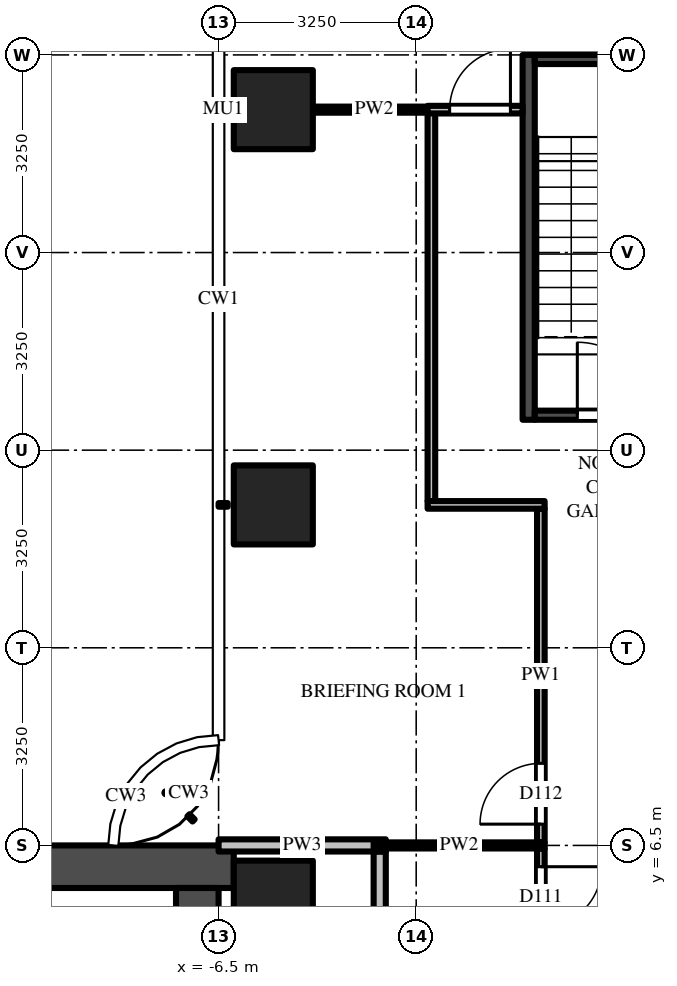
"""IFC4 building model, lengths in metres.
Left out: names, types, materials, properties, quantities, classifications, styles, units other than length and angle.
Written with IfcOpenShell. Run it as: python <this file> out.ifc"""

import sys

from ifc_helpers import new_model, si_unit, direction, frame, frame_2d, origin, origin_2d, place, context, subcontext, project, spatial, rectangle, extrude, source, transform, mapped, element, fill, save


model = new_model("IFC4")
c1 = context("Model", 3, precision=1e-05, world=origin(), true_north=direction((0.0, 1.0)))
c2 = subcontext(c1, "Body", "Model", "MODEL_VIEW")
j1 = project(units=[si_unit("LENGTHUNIT", "METRE"), si_unit("PLANEANGLEUNIT", "RADIAN")], contexts=[c1])
p1 = place(None, origin())
s1 = spatial("IfcSite", under=j1, at=p1, CompositionType="ELEMENT")
p2 = place(p1, origin())
s2 = spatial("IfcBuilding", under=s1, at=p2, CompositionType="ELEMENT")
p3 = place(p2, frame((0.0, 0.0, 138.0)))
s3 = spatial("IfcBuildingStorey", under=s2, at=p3, CompositionType="ELEMENT", Elevation=138.0)
m1 = source(origin(), c2, "Body", "SweptSolid", [
    extrude(rectangle(XDim=1.3, YDim=1.3, at=origin_2d()), origin(), (0.0, 0.0, 1.0), 4.5),
])
for number, where, z_axis, x_axis in (
    (1, (-5.6, 12.1, 0.0), (0.0, 0.0, 1.0), (1.0, 0.0, 0.0)),
    (2, (-5.6, 18.6, 0.0), (0.0, 0.0, 1.0), (1.0, 0.0, 0.0)),
    (3, (-5.6, 5.6, 0.0), (0.0, 0.0, 1.0), (1.0, 0.0, 0.0)),
):
    element("IfcColumn", number, at=place(p3, frame(where, z_axis=z_axis, x_axis=x_axis)), inside=s3, PredefinedType="COLUMN", context=c2, shape_type="MappedRepresentation", body=[
        mapped(m1, transform((0.0, 0.0, 0.0))),
    ])
m2 = source(origin(), c2, "Body", "SweptSolid", [
    extrude(rectangle(XDim=16.5, YDim=0.7, at=frame_2d((8.25, 0.0))), origin(), (0.0, 0.0, 1.0), 4.25),
])
p4 = place(p3, frame((-6.25, 6.15, 0.0), z_axis=(0.0, 0.0, 1.0), x_axis=(-1.0, 0.0, 0.0)))
e4 = element("IfcWall", 4, at=p4, inside=s3, PredefinedType="SHEAR", context=c2, shape_type="MappedRepresentation", body=[
    mapped(m2, transform((0.0, 0.0, 0.0))),
])
m3 = source(origin(), c2, "Body", "SweptSolid", [
    extrude(rectangle(XDim=9.05, YDim=0.7, at=frame_2d((4.525, 0.0))), origin(), (0.0, 0.0, 1.0), 4.25),
])
p5 = place(p3, frame((-6.85, 5.8, 0.0), z_axis=(0.0, 0.0, 1.0), x_axis=(0.0, -1.0, 0.0)))
e5 = element("IfcWall", 5, at=p5, inside=s3, PredefinedType="SHEAR", context=c2, shape_type="MappedRepresentation", body=[
    mapped(m3, transform((0.0, 0.0, 0.0))),
])
m4 = source(origin(), c2, "Body", "SweptSolid", [
    extrude(rectangle(XDim=1.8, YDim=2.1, at=frame_2d((0.9, 1.05))), frame((0.0, 0.36, 0.0), z_axis=(0.0, -1.0, 0.0), x_axis=(1.0, 0.0, 0.0)), (0.0, 0.0, 1.0), 0.72),
])
p6 = place(p5, frame((3.15, 0.0, 0.0)))
e6 = element("IfcOpeningElement", 6, at=p6, cuts=e5, PredefinedType="OPENING", context=c2, shape_type="MappedRepresentation", body=[
    mapped(m4, transform((0.0, 0.0, 0.0))),
])
m5 = source(origin(), c2, "Body", "SweptSolid", [
    extrude(rectangle(XDim=6.0, YDim=0.2, at=frame_2d((3.0, 0.0))), origin(), (0.0, 0.0, 1.0), 4.25),
])
p7 = place(p3, frame((-1.4, 13.5, 0.0), z_axis=(0.0, 0.0, 1.0), x_axis=(0.0, 1.0, 0.0)))
e7 = element("IfcWall", 7, at=p7, inside=s3, PredefinedType="SHEAR", context=c2, shape_type="MappedRepresentation", body=[
    mapped(m5, transform((0.0, 0.0, 0.0))),
])
m6 = source(origin(), c2, "Body", "SweptSolid", [
    extrude(rectangle(XDim=2.6, YDim=0.15, at=frame_2d((1.3, 0.0))), origin(), (0.0, 0.0, 1.0), 4.25),
])
p8 = place(p3, frame((-1.3, 13.575, 0.0), z_axis=(0.0, 0.0, 1.0), x_axis=(1.0, 0.0, 0.0)))
e8 = element("IfcWall", 8, at=p8, inside=s3, PredefinedType="SHEAR", context=c2, shape_type="MappedRepresentation", body=[
    mapped(m6, transform((0.0, 0.0, 0.0))),
])
m7 = source(origin(), c2, "Body", "SweptSolid", [
    extrude(rectangle(XDim=1.2, YDim=2.1, at=frame_2d((0.6, 1.05))), frame((0.0, 0.085, 0.0), z_axis=(0.0, -1.0, 0.0), x_axis=(1.0, 0.0, 0.0)), (0.0, 0.0, 1.0), 0.17),
])
p9 = place(p8, frame((0.7, 0.0, 0.0)))
e9 = element("IfcOpeningElement", 9, at=p9, cuts=e8, PredefinedType="OPENING", context=c2, shape_type="MappedRepresentation", body=[
    mapped(m7, transform((0.0, 0.0, 0.0))),
])
p10 = place(p3, frame((-1.3, 19.425, 0.0), z_axis=(0.0, 0.0, 1.0), x_axis=(1.0, 0.0, 0.0)))
e10 = element("IfcWall", 10, at=p10, inside=s3, PredefinedType="SHEAR", context=c2, shape_type="MappedRepresentation", body=[
    mapped(m6, transform((0.0, 0.0, 0.0))),
])
m8 = source(origin(), c2, "Body", "SweptSolid", [
    extrude(rectangle(XDim=3.087, YDim=0.2, at=frame_2d((1.544, 0.0))), origin(), (0.0, 0.0, 1.0), 3.468),
])
p11 = place(p3, frame((-3.85, 3.312, 0.0), z_axis=(0.0, 0.0, 1.0), x_axis=(0.0, 1.0, 0.0)))
e11 = element("IfcWall", 11, at=p11, inside=s3, PredefinedType="PARTITIONING", context=c2, shape_type="MappedRepresentation", body=[
    mapped(m8, transform((0.0, 0.0, 0.0))),
])
m9 = source(origin(), c2, "Body", "SweptSolid", [
    extrude(rectangle(XDim=6.387, YDim=0.125, at=frame_2d((3.194, 0.0))), origin(), (0.0, 0.0, 1.0), 3.468),
])
p12 = place(p3, frame((-3.0, 12.163, 0.0), z_axis=(0.0, 0.0, 1.0), x_axis=(0.0, 1.0, 0.0)))
e12 = element("IfcWall", 12, at=p12, inside=s3, PredefinedType="PARTITIONING", context=c2, shape_type="MappedRepresentation", body=[
    mapped(m9, transform((0.0, 0.0, 0.0))),
])
m10 = source(origin(), c2, "Body", "SweptSolid", [
    extrude(rectangle(XDim=3.137, YDim=0.125, at=frame_2d((1.569, 0.0))), origin(), (0.0, 0.0, 1.0), 3.468),
])
p13 = place(p3, frame((-1.2, 6.45, 0.0), z_axis=(0.0, 0.0, 1.0), x_axis=(0.0, -1.0, 0.0)))
e13 = element("IfcWall", 13, at=p13, inside=s3, PredefinedType="PARTITIONING", context=c2, shape_type="MappedRepresentation", body=[
    mapped(m10, transform((0.0, 0.0, 0.0))),
])
m11 = source(origin(), c2, "Body", "SweptSolid", [
    extrude(rectangle(XDim=1.0, YDim=2.1, at=frame_2d((0.5, 1.05))), frame((0.0, 0.073, 0.0), z_axis=(0.0, -1.0, 0.0), x_axis=(1.0, 0.0, 0.0)), (0.0, 0.0, 1.0), 0.145),
])
p14 = place(p13, frame((0.3, 0.0, 0.0)))
e14 = element("IfcOpeningElement", 14, at=p14, cuts=e13, PredefinedType="OPENING", context=c2, shape_type="MappedRepresentation", body=[
    mapped(m11, transform((0.0, 0.0, 0.0))),
])
m12 = source(origin(), c2, "Body", "SweptSolid", [
    extrude(rectangle(XDim=5.488, YDim=0.125, at=frame_2d((2.744, 0.0))), origin(), (0.0, 0.0, 1.0), 3.468),
])
p15 = place(p3, frame((-1.2, 6.55, 0.0), z_axis=(0.0, 0.0, 1.0), x_axis=(0.0, 1.0, 0.0)))
e15 = element("IfcWall", 15, at=p15, inside=s3, PredefinedType="PARTITIONING", context=c2, shape_type="MappedRepresentation", body=[
    mapped(m12, transform((0.0, 0.0, 0.0))),
])
p16 = place(p15, frame((0.3, 0.0, 0.0)))
e16 = element("IfcOpeningElement", 16, at=p16, cuts=e15, PredefinedType="OPENING", context=c2, shape_type="MappedRepresentation", body=[
    mapped(m11, transform((0.0, 0.0, 0.0))),
])
m13 = source(origin(), c2, "Body", "SweptSolid", [
    extrude(rectangle(XDim=2.75, YDim=0.2, at=frame_2d((1.375, 0.0))), origin(), (0.0, 0.0, 1.0), 3.33),
])
p17 = place(p3, frame((-6.5, 6.5, 0.0), z_axis=(0.0, 0.0, 1.0), x_axis=(1.0, 0.0, 0.0)))
e17 = element("IfcWall", 17, at=p17, inside=s3, PredefinedType="PARTITIONING", context=c2, shape_type="MappedRepresentation", body=[
    mapped(m13, transform((0.0, 0.0, 0.0))),
])
m14 = source(origin(), c2, "Body", "SweptSolid", [
    extrude(rectangle(XDim=2.812, YDim=0.1, at=frame_2d((1.406, 0.0))), origin(), (0.0, 0.0, 1.0), 4.25),
])
p18 = place(p3, frame((-3.95, 6.5, 0.0), z_axis=(0.0, 0.0, 1.0), x_axis=(1.0, 0.0, 0.0)))
e18 = element("IfcWall", 18, at=p18, inside=s3, PredefinedType="PARTITIONING", context=c2, shape_type="MappedRepresentation", body=[
    mapped(m14, transform((0.0, 0.0, 0.0))),
])
m15 = source(origin(), c2, "Body", "SweptSolid", [
    extrude(rectangle(XDim=1.925, YDim=0.125, at=frame_2d((0.962, 0.0))), origin(), (0.0, 0.0, 1.0), 3.468),
])
p19 = place(p3, frame((-1.137, 12.1, 0.0), z_axis=(0.0, 0.0, 1.0), x_axis=(-1.0, 0.0, 0.0)))
e19 = element("IfcWall", 19, at=p19, inside=s3, PredefinedType="PARTITIONING", context=c2, shape_type="MappedRepresentation", body=[
    mapped(m15, transform((0.0, 0.0, 0.0))),
])
m16 = source(origin(), c2, "Body", "SweptSolid", [
    extrude(rectangle(XDim=2.012, YDim=0.1, at=frame_2d((1.006, 0.0))), origin(), (0.0, 0.0, 1.0), 3.697),
])
p20 = place(p3, frame((-4.95, 18.6, 0.0), z_axis=(0.0, 0.0, 1.0), x_axis=(1.0, 0.0, 0.0)))
e20 = element("IfcWall", 20, at=p20, inside=s3, PredefinedType="PARTITIONING", context=c2, shape_type="MappedRepresentation", body=[
    mapped(m16, transform((0.0, 0.0, 0.0))),
])
m17 = source(origin(), c2, "Body", "SweptSolid", [
    extrude(rectangle(XDim=1.562, YDim=0.125, at=frame_2d((0.781, 0.0))), origin(), (0.0, 0.0, 1.0), 3.697),
])
p21 = place(p3, frame((-3.062, 18.6, 0.0), z_axis=(0.0, 0.0, 1.0), x_axis=(1.0, 0.0, 0.0)))
e21 = element("IfcWall", 21, at=p21, inside=s3, PredefinedType="PARTITIONING", context=c2, shape_type="MappedRepresentation", body=[
    mapped(m17, transform((0.0, 0.0, 0.0))),
])
p22 = place(p21, frame((0.363, 0.0, 0.0)))
e22 = element("IfcOpeningElement", 22, at=p22, cuts=e21, PredefinedType="OPENING", context=c2, shape_type="MappedRepresentation", body=[
    mapped(m11, transform((0.0, 0.0, 0.0))),
])
m18 = source(origin(), c2, "Body", "SweptSolid", [
    extrude(rectangle(XDim=1.2, YDim=2.1, at=frame_2d((0.6, 1.05))), frame((0.0, 0.025, 0.0), z_axis=(0.0, -1.0, 0.0), x_axis=(1.0, 0.0, 0.0)), (0.0, 0.0, 1.0), 0.05),
])
p23 = place(p9, origin())
e23 = element("IfcDoor", 23, at=p23, inside=s3, OperationType="SINGLE_SWING_LEFT", PredefinedType="DOOR", context=c2, shape_type="MappedRepresentation", body=[
    mapped(m18, transform((0.0, 0.0, 0.0))),
])
fill(e9, e23)
m19 = source(origin(), c2, "Body", "SweptSolid", [
    extrude(rectangle(XDim=1.0, YDim=2.1, at=frame_2d((0.5, 1.05))), frame((0.0, 0.025, 0.0), z_axis=(0.0, -1.0, 0.0), x_axis=(1.0, 0.0, 0.0)), (0.0, 0.0, 1.0), 0.05),
])
p24 = place(p14, origin())
e24 = element("IfcDoor", 24, at=p24, inside=s3, OperationType="SINGLE_SWING_LEFT", PredefinedType="DOOR", context=c2, shape_type="MappedRepresentation", body=[
    mapped(m19, transform((0.0, 0.0, 0.0))),
])
fill(e14, e24)
p25 = place(p16, origin())
e25 = element("IfcDoor", 25, at=p25, inside=s3, OperationType="SINGLE_SWING_LEFT", PredefinedType="DOOR", context=c2, shape_type="MappedRepresentation", body=[
    mapped(m19, transform((0.0, 0.0, 0.0))),
])
fill(e16, e25)
p26 = place(p22, origin())
e26 = element("IfcDoor", 26, at=p26, inside=s3, OperationType="SINGLE_SWING_RIGHT", PredefinedType="DOOR", context=c2, shape_type="MappedRepresentation", body=[
    mapped(m19, transform((0.0, 0.0, 0.0))),
])
fill(e22, e26)
save(model, sys.argv[1])
